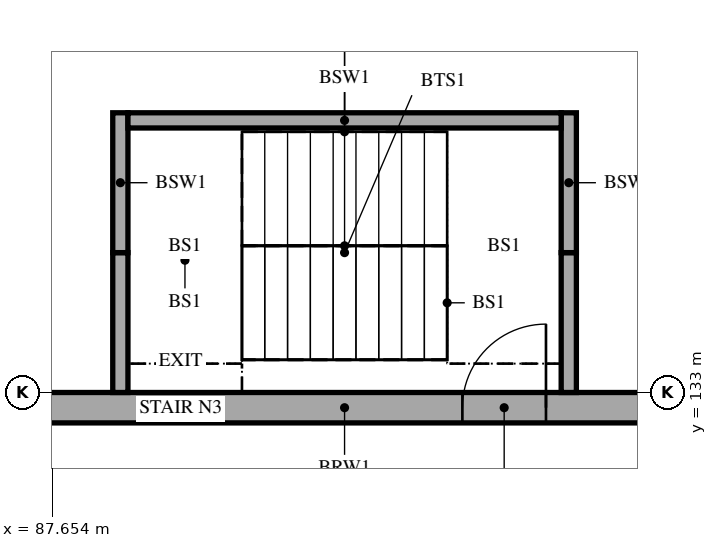
"""IFC4 building model, lengths in metres.
Left out: names, types, materials, properties, quantities, classifications, styles, units other than length and angle.
Written with IfcOpenShell. Run it as: python <this file> out.ifc"""

import sys

from ifc_helpers import new_model, si_unit, direction, frame, frame_2d, origin, place, context, subcontext, project, spatial, rectangle, extrude, element, fill, save


model = new_model("IFC4")
c1 = context("Model", 3, precision=1e-05, world=origin(), true_north=direction((0.0, 1.0)))
c2 = subcontext(c1, "Body", "Model", "MODEL_VIEW")
j1 = project(units=[si_unit("LENGTHUNIT", "METRE"), si_unit("PLANEANGLEUNIT", "RADIAN")], contexts=[c1])
p1 = place(None, origin())
s1 = spatial("IfcSite", under=j1, at=p1, CompositionType="ELEMENT")
p2 = place(p1, origin())
s2 = spatial("IfcBuilding", under=s1, at=p2, CompositionType="ELEMENT")
p3 = place(p2, frame((0.0, 0.0, -8.4)))
s3 = spatial("IfcBuildingStorey", under=s2, at=p3, CompositionType="ELEMENT", Elevation=-8.4)
p4 = place(p3, frame((87.4, 132.8, 0.0), z_axis=(0.0, 0.0, 1.0), x_axis=(1.0, 0.0, 0.0)))
e1 = element("IfcWall", 1, at=p4, inside=s3, PredefinedType="SOLIDWALL", context=c2, shape_type="SweptSolid", body=[
    extrude(rectangle(XDim=8.2, YDim=0.4, at=frame_2d((4.1, 0.0))), origin(), (0.0, 0.0, 1.0), 4.2),
])
p5 = place(p4, frame((5.65, 0.0, 0.0)))
e2 = element("IfcOpeningElement", 2, at=p5, cuts=e1, PredefinedType="OPENING", context=c2, shape_type="SweptSolid", body=[
    extrude(rectangle(XDim=1.1, YDim=2.1, at=frame_2d((0.55, 1.05))), frame((0.0, 0.21, 0.0), z_axis=(0.0, -1.0, 0.0), x_axis=(1.0, 0.0, 0.0)), (0.0, 0.0, 1.0), 0.42),
])
p6 = place(p3, frame((94.45, 133.0, 0.0), z_axis=(0.0, 0.0, 1.0), x_axis=(0.0, 1.0, 0.0)))
e3 = element("IfcWall", 3, at=p6, inside=s3, PredefinedType="SOLIDWALL", context=c2, shape_type="SweptSolid", body=[
    extrude(rectangle(XDim=1.84, YDim=0.2, at=frame_2d((0.92, 0.0))), origin(), (0.0, 0.0, 1.0), 4.2),
])
p7 = place(p3, frame((94.45, 134.84, 0.0), z_axis=(0.0, 0.0, 1.0), x_axis=(0.0, 1.0, 0.0)))
e4 = element("IfcWall", 4, at=p7, inside=s3, PredefinedType="SOLIDWALL", context=c2, shape_type="SweptSolid", body=[
    extrude(rectangle(XDim=1.84, YDim=0.2, at=frame_2d((0.92, 0.0))), origin(), (0.0, 0.0, 1.0), 4.2),
])
p8 = place(p3, frame((88.55, 133.0, 0.0), z_axis=(0.0, 0.0, 1.0), x_axis=(0.0, 1.0, 0.0)))
e5 = element("IfcWall", 5, at=p8, inside=s3, PredefinedType="SOLIDWALL", context=c2, shape_type="SweptSolid", body=[
    extrude(rectangle(XDim=1.84, YDim=0.2, at=frame_2d((0.92, 0.0))), origin(), (0.0, 0.0, 1.0), 4.2),
])
p9 = place(p3, frame((88.55, 134.84, 0.0), z_axis=(0.0, 0.0, 1.0), x_axis=(0.0, 1.0, 0.0)))
e6 = element("IfcWall", 6, at=p9, inside=s3, PredefinedType="SOLIDWALL", context=c2, shape_type="SweptSolid", body=[
    extrude(rectangle(XDim=1.84, YDim=0.2, at=frame_2d((0.92, 0.0))), origin(), (0.0, 0.0, 1.0), 4.2),
])
p10 = place(p3, frame((94.35, 136.58, 0.0), z_axis=(0.0, 0.0, 1.0), x_axis=(-1.0, 0.0, 0.0)))
e7 = element("IfcWall", 7, at=p10, inside=s3, PredefinedType="SOLIDWALL", context=c2, shape_type="SweptSolid", body=[
    extrude(rectangle(XDim=5.7, YDim=0.2, at=frame_2d((2.85, 0.0))), origin(), (0.0, 0.0, 1.0), 4.2),
])
p11 = place(p5, origin())
e8 = element("IfcDoor", 8, at=p11, inside=s3, OperationType="SINGLE_SWING_RIGHT", PredefinedType="DOOR", context=c2, shape_type="SweptSolid", body=[
    extrude(rectangle(XDim=1.1, YDim=2.1, at=frame_2d((0.55, 1.05))), frame((0.0, 0.025, 0.0), z_axis=(0.0, -1.0, 0.0), x_axis=(1.0, 0.0, 0.0)), (0.0, 0.0, 1.0), 0.05),
])
fill(e2, e8)
save(model, sys.argv[1])
